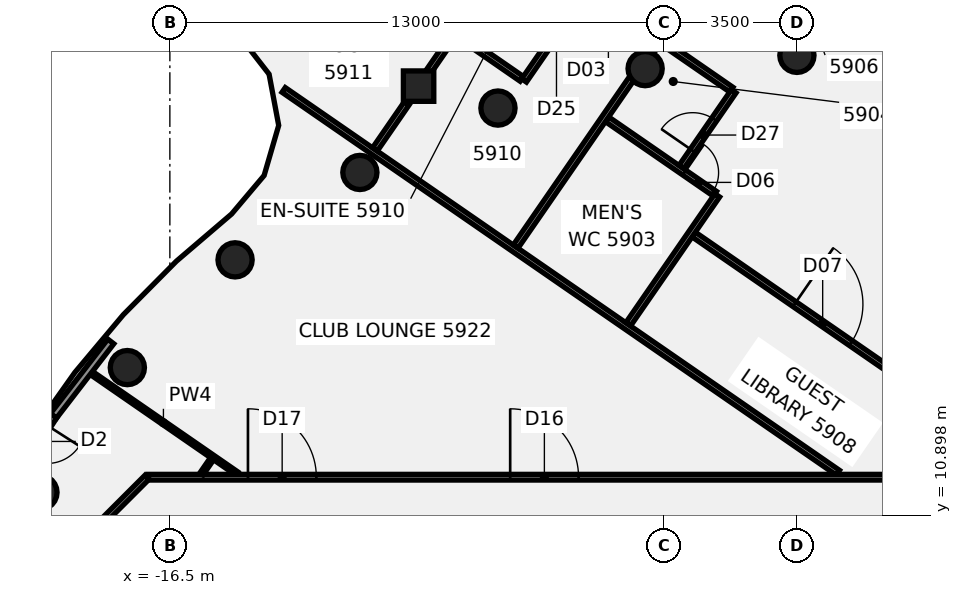
"""IFC4 building model, lengths in metres.
Left out: names, types, materials, properties, quantities, classifications, styles, units other than length and angle.
Written with IfcOpenShell. Run it as: python <this file> out.ifc"""

import sys

from ifc_helpers import new_model, si_unit, direction, frame, frame_2d, origin, origin_2d, place, context, subcontext, project, spatial, rectangle, circle, extrude, element, fill, save


model = new_model("IFC4")
c1 = context("Model", 3, precision=1e-05, world=origin(), true_north=direction((0.0, 1.0)))
c2 = subcontext(c1, "Body", "Model", "MODEL_VIEW")
j1 = project(units=[si_unit("LENGTHUNIT", "METRE"), si_unit("PLANEANGLEUNIT", "RADIAN")], contexts=[c1])
p1 = place(None, origin())
s1 = spatial("IfcSite", under=j1, at=p1, CompositionType="ELEMENT")
p2 = place(p1, origin())
s2 = spatial("IfcBuilding", under=s1, at=p2, CompositionType="ELEMENT")
p3 = place(p2, frame((0.0, 0.0, 234.3)))
s3 = spatial("IfcBuildingStorey", under=s2, at=p3, CompositionType="ELEMENT", Elevation=234.3)
for number, where, z_axis, x_axis in (
    (1, (0.0, 23.0, -0.14), (0.0, 0.0, 1.0), (1.0, 0.0, 0.0)),
    (2, (-3.994, 22.651, -0.14), (0.0, 0.0, 1.0), (1.0, 0.0, 0.0)),
    (3, (-7.866, 21.613, -0.14), (0.0, 0.0, 1.0), (1.0, 0.0, 0.0)),
    (4, (-11.5, 19.919, -0.14), (0.0, 0.0, 1.0), (1.0, 0.0, 0.0)),
    (5, (-14.784, 17.619, -0.14), (0.0, 0.0, 1.0), (1.0, 0.0, 0.0)),
    (6, (-17.619, 14.784, -0.14), (0.0, 0.0, 1.0), (1.0, 0.0, 0.0)),
    (7, (-19.919, 11.5, -0.14), (0.0, 0.0, 1.0), (1.0, 0.0, 0.0)),
):
    element("IfcColumn", number, at=place(p3, frame(where, z_axis=z_axis, x_axis=x_axis)), inside=s3, PredefinedType="COLUMN", context=c2, shape_type="SweptSolid", body=[
        extrude(circle(Radius=0.45, at=origin_2d()), origin(), (0.0, 0.0, 1.0), 3.6),
    ])
p4 = place(p3, frame((-9.955, 22.19, -0.139), z_axis=(-0.000474424421, -0.050356763522, 0.998731180693), x_axis=(0.5677282831, 0.822157981301, 0.041723498785)))
e8 = element("IfcColumn", 8, at=p4, inside=s3, PredefinedType="COLUMN", context=c2, shape_type="SweptSolid", body=[
    extrude(rectangle(XDim=0.8, YDim=0.8, at=origin_2d()), origin(), (0.0, 0.0, 1.0), 3.602),
])
p5 = place(p3, frame((-18.599, 14.666, 0.0), z_axis=(0.0, 0.0, 1.0), x_axis=(0.822736975371, -0.56842226325, 0.0)))
e9 = element("IfcWall", 9, at=p5, inside=s3, PredefinedType="PARTITIONING", context=c2, shape_type="SweptSolid", body=[
    extrude(rectangle(XDim=4.691, YDim=0.1, at=frame_2d((2.346, 0.0))), origin(), (0.0, 0.0, 1.0), 2.864),
])
p6 = place(p3, frame((-13.505, 22.09, 0.0), z_axis=(0.0, 0.0, 1.0), x_axis=(0.822876963687, -0.568219590152, 0.0)))
e10 = element("IfcWall", 10, at=p6, inside=s3, PredefinedType="PARTITIONING", context=c2, shape_type="SweptSolid", body=[
    extrude(rectangle(XDim=17.723, YDim=0.15, at=frame_2d((8.861, 0.0))), origin(), (0.0, 0.0, 1.0), 2.864),
])
p7 = place(p3, frame((-10.782, 24.828, 0.0), z_axis=(0.0, 0.0, 1.0), x_axis=(0.822836909999, -0.568277590217, 0.0)))
e11 = element("IfcWall", 11, at=p7, inside=s3, PredefinedType="PARTITIONING", context=c2, shape_type="SweptSolid", body=[
    extrude(rectangle(XDim=4.304, YDim=0.15, at=frame_2d((2.152, 0.0))), origin(), (0.0, 0.0, 1.0), 2.864),
])
p8 = place(p3, frame((-4.993, 21.316, 0.0), z_axis=(0.0, 0.0, 1.0), x_axis=(0.823002595966, -0.568037610579, 0.0)))
e12 = element("IfcWall", 12, at=p8, inside=s3, PredefinedType="PARTITIONING", context=c2, shape_type="SweptSolid", body=[
    extrude(rectangle(XDim=3.445, YDim=0.15, at=frame_2d((1.723, 0.0))), origin(), (0.0, 0.0, 1.0), 2.864),
])
p9 = place(p8, frame((2.47, 0.0, 0.0)))
e13 = element("IfcOpeningElement", 13, at=p9, cuts=e12, PredefinedType="OPENING", context=c2, shape_type="SweptSolid", body=[
    extrude(rectangle(XDim=0.9, YDim=2.1, at=frame_2d((0.45, 1.05))), frame((0.0, 0.085, 0.0), z_axis=(0.0, -1.0, 0.0), x_axis=(1.0, 0.0, 0.0)), (0.0, 0.0, 1.0), 0.17),
])
p10 = place(p3, frame((-3.556, 23.362, 0.0), z_axis=(0.0, 0.0, 1.0), x_axis=(0.822823613498, -0.568296842389, 0.0)))
e14 = element("IfcWall", 14, at=p10, inside=s3, PredefinedType="PARTITIONING", context=c2, shape_type="SweptSolid", body=[
    extrude(rectangle(XDim=2.225, YDim=0.15, at=frame_2d((1.113, 0.0))), origin(), (0.0, 0.0, 1.0), 2.864),
])
p11 = place(p3, frame((-2.712, 18.282, 0.0), z_axis=(0.0, 0.0, 1.0), x_axis=(0.822882105938, -0.568212143242, 0.0)))
e15 = element("IfcWall", 15, at=p11, inside=s3, PredefinedType="PARTITIONING", context=c2, shape_type="SweptSolid", body=[
    extrude(rectangle(XDim=11.023, YDim=0.15, at=frame_2d((5.511, 0.0))), origin(), (0.0, 0.0, 1.0), 2.864),
])
p12 = place(p11, frame((3.22, 0.0, 0.0)))
e16 = element("IfcOpeningElement", 16, at=p12, cuts=e15, PredefinedType="OPENING", context=c2, shape_type="SweptSolid", body=[
    extrude(rectangle(XDim=1.8, YDim=2.1, at=frame_2d((0.9, 1.05))), frame((0.0, 0.085, 0.0), z_axis=(0.0, -1.0, 0.0), x_axis=(1.0, 0.0, 0.0)), (0.0, 0.0, 1.0), 0.17),
])
p13 = place(p3, frame((-17.065, 11.9, 0.0), z_axis=(0.0, 0.0, 1.0), x_axis=(1.0, 0.0, 0.0)))
e17 = element("IfcWall", 17, at=p13, inside=s3, PredefinedType="PARTITIONING", context=c2, shape_type="SweptSolid", body=[
    extrude(rectangle(XDim=34.165, YDim=0.15, at=frame_2d((17.083, 0.0))), origin(), (0.0, 0.0, 1.0), 2.864),
])
p14 = place(p13, frame((24.496, 0.0, 0.0)))
e18 = element("IfcOpeningElement", 18, at=p14, cuts=e17, PredefinedType="OPENING", context=c2, shape_type="SweptSolid", body=[
    extrude(rectangle(XDim=1.8, YDim=2.1, at=frame_2d((0.9, 1.05))), frame((0.0, 0.085, 0.0), z_axis=(0.0, -1.0, 0.0), x_axis=(1.0, 0.0, 0.0)), (0.0, 0.0, 1.0), 0.17),
])
p15 = place(p13, frame((9.52, 0.0, 0.0)))
e19 = element("IfcOpeningElement", 19, at=p15, cuts=e17, PredefinedType="OPENING", context=c2, shape_type="SweptSolid", body=[
    extrude(rectangle(XDim=1.8, YDim=2.1, at=frame_2d((0.9, 1.05))), frame((0.0, 0.085, 0.0), z_axis=(0.0, -1.0, 0.0), x_axis=(1.0, 0.0, 0.0)), (0.0, 0.0, 1.0), 0.17),
])
p16 = place(p13, frame((2.62, 0.0, 0.0)))
e20 = element("IfcOpeningElement", 20, at=p16, cuts=e17, PredefinedType="OPENING", context=c2, shape_type="SweptSolid", body=[
    extrude(rectangle(XDim=1.8, YDim=2.1, at=frame_2d((0.9, 1.05))), frame((0.0, 0.085, 0.0), z_axis=(0.0, -1.0, 0.0), x_axis=(1.0, 0.0, 0.0)), (0.0, 0.0, 1.0), 0.17),
])
p17 = place(p3, frame((-18.872, 10.128, 0.0), z_axis=(0.0, 0.0, 1.0), x_axis=(0.707106781187, 0.707106781187, 0.0)))
e21 = element("IfcWall", 21, at=p17, inside=s3, PredefinedType="PARTITIONING", context=c2, shape_type="SweptSolid", body=[
    extrude(rectangle(XDim=2.505, YDim=0.15, at=frame_2d((1.253, 0.0))), origin(), (0.0, 0.0, 1.0), 2.864),
])
p18 = place(p3, frame((-15.667, 11.986, 0.0), z_axis=(0.0, 0.0, 1.0), x_axis=(0.568142292834, 0.822930334289, 0.0)))
e22 = element("IfcWall", 22, at=p18, inside=s3, PredefinedType="PARTITIONING", context=c2, shape_type="SweptSolid", body=[
    extrude(rectangle(XDim=0.488, YDim=0.1, at=frame_2d((0.244, 0.0))), origin(), (0.0, 0.0, 1.0), 2.864),
])
p19 = place(p3, frame((-11.103, 20.528, 0.0), z_axis=(0.0, 0.0, 1.0), x_axis=(0.568166666622, 0.822913506354, 0.0)))
e23 = element("IfcWall", 23, at=p19, inside=s3, PredefinedType="PARTITIONING", context=c2, shape_type="SweptSolid", body=[
    extrude(rectangle(XDim=1.473, YDim=0.15, at=frame_2d((0.736, 0.0))), origin(), (0.0, 0.0, 1.0), 2.864),
])
p20 = place(p3, frame((-9.722, 22.527, 0.0), z_axis=(0.0, 0.0, 1.0), x_axis=(0.568183486807, 0.822901892889, 0.0)))
e24 = element("IfcWall", 24, at=p20, inside=s3, PredefinedType="PARTITIONING", context=c2, shape_type="SweptSolid", body=[
    extrude(rectangle(XDim=3.811, YDim=0.15, at=frame_2d((1.905, 0.0))), origin(), (0.0, 0.0, 1.0), 2.864),
])
p21 = place(p3, frame((-7.399, 17.971, 0.0), z_axis=(0.0, 0.0, 1.0), x_axis=(0.568117777374, 0.822947258961, 0.0)))
e25 = element("IfcWall", 25, at=p21, inside=s3, PredefinedType="PARTITIONING", context=c2, shape_type="SweptSolid", body=[
    extrude(rectangle(XDim=5.559, YDim=0.15, at=frame_2d((2.779, 0.0))), origin(), (0.0, 0.0, 1.0), 2.864),
])
p22 = place(p3, frame((-3.986, 22.915, 0.0), z_axis=(0.0, 0.0, 1.0), x_axis=(0.568137981327, 0.822933310891, 0.0)))
e26 = element("IfcWall", 26, at=p22, inside=s3, PredefinedType="PARTITIONING", context=c2, shape_type="SweptSolid", body=[
    extrude(rectangle(XDim=8.211, YDim=0.2, at=frame_2d((4.105, 0.0))), origin(), (0.0, 0.0, 1.0), 2.864),
])
p23 = place(p22, frame((1.062, 0.0, 0.0)))
e27 = element("IfcOpeningElement", 27, at=p23, cuts=e26, PredefinedType="OPENING", context=c2, shape_type="SweptSolid", body=[
    extrude(rectangle(XDim=1.4, YDim=2.1, at=frame_2d((0.7, 1.05))), frame((0.0, 0.11, 0.0), z_axis=(0.0, -1.0, 0.0), x_axis=(1.0, 0.0, 0.0)), (0.0, 0.0, 1.0), 0.22),
])
p24 = place(p3, frame((-7.179, 22.339, 0.0), z_axis=(0.0, 0.0, 1.0), x_axis=(0.568282852212, 0.822833275872, 0.0)))
e28 = element("IfcWall", 28, at=p24, inside=s3, PredefinedType="PARTITIONING", context=c2, shape_type="SweptSolid", body=[
    extrude(rectangle(XDim=2.521, YDim=0.15, at=frame_2d((1.26, 0.0))), origin(), (0.0, 0.0, 1.0), 2.864),
])
p25 = place(p24, frame((1.05, 0.0, 0.0)))
e29 = element("IfcOpeningElement", 29, at=p25, cuts=e28, PredefinedType="OPENING", context=c2, shape_type="SweptSolid", body=[
    extrude(rectangle(XDim=0.9, YDim=2.1, at=frame_2d((0.45, 1.05))), frame((0.0, 0.085, 0.0), z_axis=(0.0, -1.0, 0.0), x_axis=(1.0, 0.0, 0.0)), (0.0, 0.0, 1.0), 0.17),
])
p26 = place(p3, frame((-4.438, 15.926, 0.0), z_axis=(0.0, 0.0, 1.0), x_axis=(0.568380820639, 0.82276560619, 0.0)))
e30 = element("IfcWall", 30, at=p26, inside=s3, PredefinedType="PARTITIONING", context=c2, shape_type="SweptSolid", body=[
    extrude(rectangle(XDim=4.12, YDim=0.15, at=frame_2d((2.06, 0.0))), origin(), (0.0, 0.0, 1.0), 2.864),
])
p27 = place(p3, frame((-3.039, 20.064, 0.0), z_axis=(0.0, 0.0, 1.0), x_axis=(0.568359858761, 0.822780086627, 0.0)))
e31 = element("IfcWall", 31, at=p27, inside=s3, PredefinedType="PARTITIONING", context=c2, shape_type="SweptSolid", body=[
    extrude(rectangle(XDim=2.42, YDim=0.15, at=frame_2d((1.21, 0.0))), origin(), (0.0, 0.0, 1.0), 2.864),
])
p28 = place(p27, frame((0.52, 0.0, 0.0)))
e32 = element("IfcOpeningElement", 32, at=p28, cuts=e31, PredefinedType="OPENING", context=c2, shape_type="SweptSolid", body=[
    extrude(rectangle(XDim=1.0, YDim=2.1, at=frame_2d((0.5, 1.05))), frame((0.0, 0.085, 0.0), z_axis=(0.0, -1.0, 0.0), x_axis=(1.0, 0.0, 0.0)), (0.0, 0.0, 1.0), 0.17),
])
p29 = place(p3, frame((-18.054, 15.471, 0.0), z_axis=(0.0, 0.0, 1.0), x_axis=(-0.61047429588, -0.792036068667, 0.0)))
e33 = element("IfcWall", 33, at=p29, inside=s3, PredefinedType="SOLIDWALL", context=c2, shape_type="SweptSolid", body=[
    extrude(rectangle(XDim=2.471, YDim=0.2, at=frame_2d((1.236, 0.0))), origin(), (0.0, 0.0, 1.0), 3.46),
])
p30 = place(p3, frame((-19.563, 13.514, 0.0), z_axis=(0.0, 0.0, 1.0), x_axis=(-0.539668889927, -0.841877359979, 0.0)))
e34 = element("IfcWall", 34, at=p30, inside=s3, PredefinedType="SOLIDWALL", context=c2, shape_type="SweptSolid", body=[
    extrude(rectangle(XDim=1.599, YDim=0.2, at=frame_2d((0.799, 0.0))), origin(), (0.0, 0.0, 1.0), 3.46),
])
p31 = place(p30, frame((0.299, 0.0, 0.0)))
e35 = element("IfcOpeningElement", 35, at=p31, cuts=e34, PredefinedType="OPENING", context=c2, shape_type="SweptSolid", body=[
    extrude(rectangle(XDim=1.0, YDim=2.4, at=frame_2d((0.5, 1.2))), frame((0.0, 0.11, 0.0), z_axis=(0.0, -1.0, 0.0), x_axis=(1.0, 0.0, 0.0)), (0.0, 0.0, 1.0), 0.22),
])
p32 = place(p9, frame((0.9, 0.0, 0.0), z_axis=(0.0, 0.0, 1.0), x_axis=(-1.0, 0.0, 0.0)))
e36 = element("IfcDoor", 36, at=p32, inside=s3, OperationType="SINGLE_SWING_RIGHT", PredefinedType="DOOR", context=c2, shape_type="SweptSolid", body=[
    extrude(rectangle(XDim=0.9, YDim=2.1, at=frame_2d((0.45, 1.05))), frame((0.0, 0.025, 0.0), z_axis=(0.0, -1.0, 0.0), x_axis=(1.0, 0.0, 0.0)), (0.0, 0.0, 1.0), 0.05),
])
fill(e13, e36)
p33 = place(p12, frame((1.8, 0.0, 0.0), z_axis=(0.0, 0.0, 1.0), x_axis=(-1.0, 0.0, 0.0)))
e37 = element("IfcDoor", 37, at=p33, inside=s3, OperationType="DOUBLE_DOOR_SINGLE_SWING", PredefinedType="DOOR", context=c2, shape_type="SweptSolid", body=[
    extrude(rectangle(XDim=1.8, YDim=2.1, at=frame_2d((0.9, 1.05))), frame((0.0, 0.025, 0.0), z_axis=(0.0, -1.0, 0.0), x_axis=(1.0, 0.0, 0.0)), (0.0, 0.0, 1.0), 0.05),
])
fill(e16, e37)
p34 = place(p15, origin())
e38 = element("IfcDoor", 38, at=p34, inside=s3, OperationType="DOUBLE_DOOR_SINGLE_SWING", PredefinedType="DOOR", context=c2, shape_type="SweptSolid", body=[
    extrude(rectangle(XDim=1.8, YDim=2.1, at=frame_2d((0.9, 1.05))), frame((0.0, 0.025, 0.0), z_axis=(0.0, -1.0, 0.0), x_axis=(1.0, 0.0, 0.0)), (0.0, 0.0, 1.0), 0.05),
])
fill(e19, e38)
p35 = place(p16, origin())
e39 = element("IfcDoor", 39, at=p35, inside=s3, OperationType="DOUBLE_DOOR_SINGLE_SWING", PredefinedType="DOOR", context=c2, shape_type="SweptSolid", body=[
    extrude(rectangle(XDim=1.8, YDim=2.1, at=frame_2d((0.9, 1.05))), frame((0.0, 0.025, 0.0), z_axis=(0.0, -1.0, 0.0), x_axis=(1.0, 0.0, 0.0)), (0.0, 0.0, 1.0), 0.05),
])
fill(e20, e39)
p36 = place(p28, origin())
e40 = element("IfcDoor", 40, at=p36, inside=s3, OperationType="SINGLE_SWING_RIGHT", PredefinedType="DOOR", context=c2, shape_type="SweptSolid", body=[
    extrude(rectangle(XDim=1.0, YDim=2.1, at=frame_2d((0.5, 1.05))), frame((0.0, 0.025, 0.0), z_axis=(0.0, -1.0, 0.0), x_axis=(1.0, 0.0, 0.0)), (0.0, 0.0, 1.0), 0.05),
])
fill(e32, e40)
save(model, sys.argv[1])
